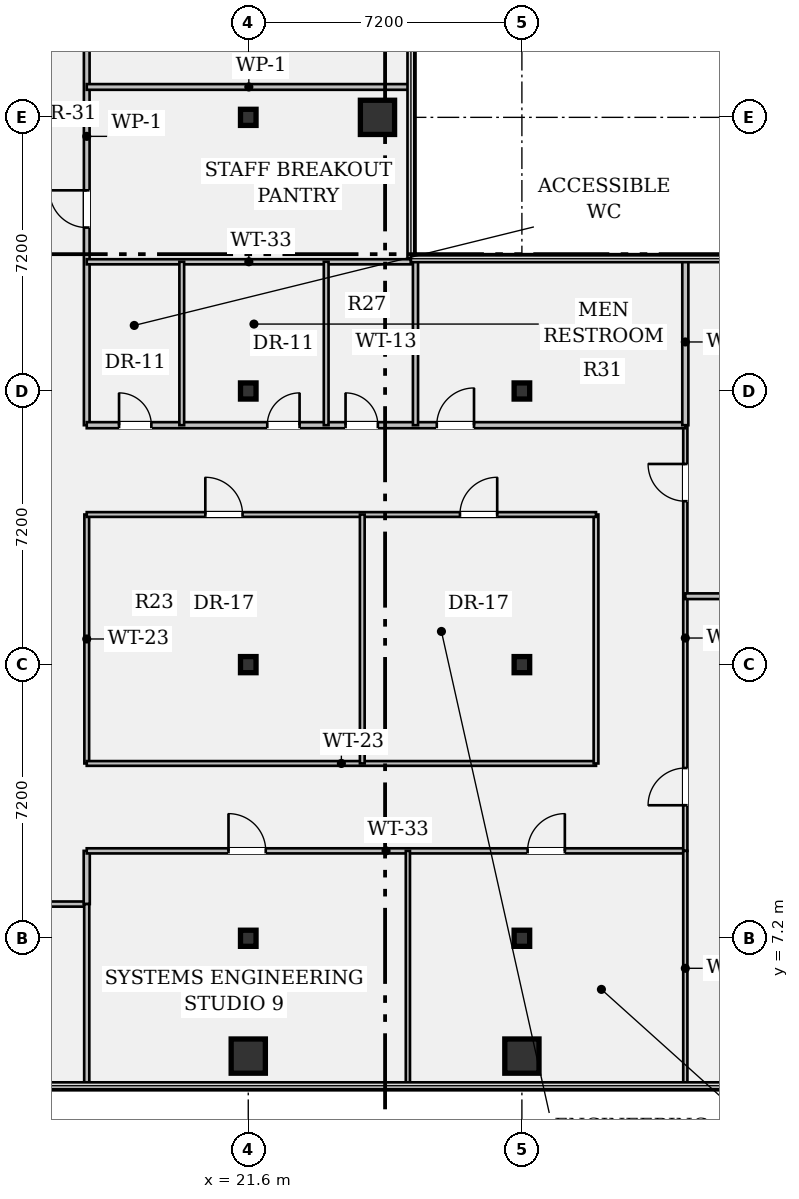
"""IFC4 building model, lengths in metres.
Left out: names, types, materials, properties, quantities, classifications, styles, units other than length and angle.
Written with IfcOpenShell. Run it as: python <this file> out.ifc"""

import sys

from ifc_helpers import new_model, si_unit, direction, frame, frame_2d, origin, origin_2d, place, context, subcontext, project, spatial, rectangle, hollow_rectangle, i_section, extrude, element, fill, save


model = new_model("IFC4")
c1 = context("Model", 3, precision=1e-05, world=origin(), true_north=direction((0.0, 1.0)))
c2 = subcontext(c1, "Body", "Model", "MODEL_VIEW")
j1 = project(units=[si_unit("LENGTHUNIT", "METRE"), si_unit("PLANEANGLEUNIT", "RADIAN")], contexts=[c1])
p1 = place(None, origin())
s1 = spatial("IfcSite", under=j1, at=p1, CompositionType="ELEMENT")
p2 = place(p1, origin())
s2 = spatial("IfcBuilding", under=s1, at=p2, CompositionType="ELEMENT")
p3 = place(p2, frame((0.0, 0.0, 144.55)))
s3 = spatial("IfcBuildingStorey", under=s2, at=p3, CompositionType="ELEMENT", Elevation=144.55)
p4 = place(p3, frame((21.6, 4.1, 0.0), z_axis=(0.0, 0.0, 1.0), x_axis=(1.0, 0.0, 0.0)))
e1 = element("IfcColumn", 1, at=p4, inside=s3, PredefinedType="COLUMN", context=c2, shape_type="SweptSolid", body=[
    extrude(hollow_rectangle(XDim=0.9, YDim=0.9, WallThickness=0.055, at=origin_2d()), origin(), (0.0, 0.0, 1.0), 3.58),
])
for number, where, z_axis, x_axis in (
    (2, (21.6, 7.2, 0.0), (0.0, 0.0, 1.0), (1.0, 0.0, 0.0)),
    (3, (21.6, 14.4, 0.0), (0.0, 0.0, 1.0), (1.0, 0.0, 0.0)),
    (4, (21.6, 21.6, 0.0), (0.0, 0.0, 1.0), (1.0, 0.0, 0.0)),
    (5, (21.6, 28.8, 0.0), (0.0, 0.0, 1.0), (1.0, 0.0, 0.0)),
):
    element("IfcColumn", number, at=place(p3, frame(where, z_axis=z_axis, x_axis=x_axis)), inside=s3, PredefinedType="COLUMN", context=c2, shape_type="SweptSolid", body=[
        extrude(i_section(OverallWidth=0.409, OverallDepth=0.424, WebThickness=0.033, FlangeThickness=0.052, FilletRadius=0.018, at=origin_2d()), origin(), (0.0, 0.0, 1.0), 3.58),
    ])
for number, where, z_axis, x_axis in (
    (6, (25.0, 28.8, 0.0), (0.0, 0.0, 1.0), (1.0, 0.0, 0.0)),
    (7, (28.8, 4.1, 0.0), (0.0, 0.0, 1.0), (1.0, 0.0, 0.0)),
):
    element("IfcColumn", number, at=place(p3, frame(where, z_axis=z_axis, x_axis=x_axis)), inside=s3, PredefinedType="COLUMN", context=c2, shape_type="SweptSolid", body=[
        extrude(hollow_rectangle(XDim=0.9, YDim=0.9, WallThickness=0.055, at=origin_2d()), origin(), (0.0, 0.0, 1.0), 3.58),
    ])
for number, where, z_axis, x_axis in (
    (8, (28.8, 7.2, 0.0), (0.0, 0.0, 1.0), (1.0, 0.0, 0.0)),
    (9, (28.8, 14.4, 0.0), (0.0, 0.0, 1.0), (1.0, 0.0, 0.0)),
    (10, (28.8, 21.6, 0.0), (0.0, 0.0, 1.0), (1.0, 0.0, 0.0)),
):
    element("IfcColumn", number, at=place(p3, frame(where, z_axis=z_axis, x_axis=x_axis)), inside=s3, PredefinedType="COLUMN", context=c2, shape_type="SweptSolid", body=[
        extrude(i_section(OverallWidth=0.409, OverallDepth=0.424, WebThickness=0.033, FlangeThickness=0.052, FilletRadius=0.018, at=origin_2d()), origin(), (0.0, 0.0, 1.0), 3.58),
    ])
p5 = place(p3, frame((14.4, 8.1, 0.0), z_axis=(0.0, 0.0, 1.0), x_axis=(1.0, 0.0, 0.0)))
e11 = element("IfcWall", 11, at=p5, inside=s3, PredefinedType="PARTITIONING", context=c2, shape_type="SweptSolid", body=[
    extrude(rectangle(XDim=2.95, YDim=0.135, at=frame_2d((1.475, 0.0))), origin(), (0.0, 0.0, 1.0), 3.148),
])
p6 = place(p5, frame((0.95, 0.0, 0.0)))
e12 = element("IfcOpeningElement", 12, at=p6, cuts=e11, PredefinedType="OPENING", context=c2, shape_type="SweptSolid", body=[
    extrude(rectangle(XDim=0.98, YDim=2.15, at=frame_2d((0.49, 1.075))), frame((0.0, 0.08, 0.0), z_axis=(0.0, -1.0, 0.0), x_axis=(1.0, 0.0, 0.0)), (0.0, 0.0, 1.0), 0.159),
])
p7 = place(p3, frame((17.35, 8.1, 0.0), z_axis=(0.0, 0.0, 1.0), x_axis=(0.0, 1.0, 0.0)))
e13 = element("IfcWall", 13, at=p7, inside=s3, PredefinedType="PARTITIONING", context=c2, shape_type="SweptSolid", body=[
    extrude(rectangle(XDim=1.4, YDim=0.16, at=frame_2d((0.7, 0.0))), origin(), (0.0, 0.0, 1.0), 3.58),
])
p8 = place(p3, frame((17.35, 20.7, 0.0), z_axis=(0.0, 0.0, 1.0), x_axis=(0.0, 1.0, 0.0)))
e14 = element("IfcWall", 14, at=p8, inside=s3, PredefinedType="PARTITIONING", context=c2, shape_type="SweptSolid", body=[
    extrude(rectangle(XDim=15.2, YDim=0.15, at=frame_2d((7.6, 0.0))), origin(), (0.0, 0.0, 1.0), 2.869),
])
p9 = place(p8, frame((5.2, 0.0, 0.0)))
e15 = element("IfcOpeningElement", 15, at=p9, cuts=e14, PredefinedType="OPENING", context=c2, shape_type="SweptSolid", body=[
    extrude(rectangle(XDim=0.98, YDim=2.15, at=frame_2d((0.49, 1.075))), frame((0.0, 0.087, 0.0), z_axis=(0.0, -1.0, 0.0), x_axis=(1.0, 0.0, 0.0)), (0.0, 0.0, 1.0), 0.174),
])
p10 = place(p8, frame((10.6, 0.0, 0.0)))
e16 = element("IfcOpeningElement", 16, at=p10, cuts=e14, PredefinedType="OPENING", context=c2, shape_type="SweptSolid", body=[
    extrude(rectangle(XDim=1.0, YDim=2.15, at=frame_2d((0.5, 1.075))), frame((0.0, 0.087, 0.0), z_axis=(0.0, -1.0, 0.0), x_axis=(1.0, 0.0, 0.0)), (0.0, 0.0, 1.0), 0.174),
])
p11 = place(p3, frame((17.35, 9.5, 0.0), z_axis=(0.0, 0.0, 1.0), x_axis=(1.0, 0.0, 0.0)))
e17 = element("IfcWall", 17, at=p11, inside=s3, PredefinedType="PARTITIONING", context=c2, shape_type="SweptSolid", body=[
    extrude(rectangle(XDim=15.75, YDim=0.135, at=frame_2d((7.875, 0.0))), origin(), (0.0, 0.0, 1.0), 2.869),
])
p12 = place(p11, frame((3.73, 0.0, 0.0)))
e18 = element("IfcOpeningElement", 18, at=p12, cuts=e17, PredefinedType="OPENING", context=c2, shape_type="SweptSolid", body=[
    extrude(rectangle(XDim=0.98, YDim=2.15, at=frame_2d((0.49, 1.075))), frame((0.0, 0.08, 0.0), z_axis=(0.0, -1.0, 0.0), x_axis=(1.0, 0.0, 0.0)), (0.0, 0.0, 1.0), 0.159),
])
p13 = place(p11, frame((11.6, 0.0, 0.0)))
e19 = element("IfcOpeningElement", 19, at=p13, cuts=e17, PredefinedType="OPENING", context=c2, shape_type="SweptSolid", body=[
    extrude(rectangle(XDim=0.98, YDim=2.15, at=frame_2d((0.49, 1.075))), frame((0.0, 0.08, 0.0), z_axis=(0.0, -1.0, 0.0), x_axis=(1.0, 0.0, 0.0)), (0.0, 0.0, 1.0), 0.159),
])
p14 = place(p3, frame((33.1, 9.5, 0.0), z_axis=(0.0, 0.0, 1.0), x_axis=(0.0, 1.0, 0.0)))
e20 = element("IfcWall", 20, at=p14, inside=s3, PredefinedType="PARTITIONING", context=c2, shape_type="SweptSolid", body=[
    extrude(rectangle(XDim=11.2, YDim=0.11, at=frame_2d((5.6, 0.0))), origin(), (0.0, 0.0, 1.0), 2.869),
])
p15 = place(p14, frame((1.2, 0.0, 0.0)))
e21 = element("IfcOpeningElement", 21, at=p15, cuts=e20, PredefinedType="OPENING", context=c2, shape_type="SweptSolid", body=[
    extrude(rectangle(XDim=0.98, YDim=2.15, at=frame_2d((0.49, 1.075))), frame((0.0, 0.067, 0.0), z_axis=(0.0, -1.0, 0.0), x_axis=(1.0, 0.0, 0.0)), (0.0, 0.0, 1.0), 0.134),
])
p16 = place(p14, frame((9.2, 0.0, 0.0)))
e22 = element("IfcOpeningElement", 22, at=p16, cuts=e20, PredefinedType="OPENING", context=c2, shape_type="SweptSolid", body=[
    extrude(rectangle(XDim=0.98, YDim=2.15, at=frame_2d((0.49, 1.075))), frame((0.0, 0.067, 0.0), z_axis=(0.0, -1.0, 0.0), x_axis=(1.0, 0.0, 0.0)), (0.0, 0.0, 1.0), 0.134),
])
p17 = place(p3, frame((17.35, 20.7, 0.0), z_axis=(0.0, 0.0, 1.0), x_axis=(1.0, 0.0, 0.0)))
e23 = element("IfcWall", 23, at=p17, inside=s3, PredefinedType="PARTITIONING", context=c2, shape_type="SweptSolid", body=[
    extrude(rectangle(XDim=15.75, YDim=0.16, at=frame_2d((7.875, 0.0))), origin(), (0.0, 0.0, 1.0), 2.869),
])
p18 = place(p17, frame((0.85, 0.0, 0.0)))
e24 = element("IfcOpeningElement", 24, at=p18, cuts=e23, PredefinedType="OPENING", context=c2, shape_type="SweptSolid", body=[
    extrude(rectangle(XDim=0.85, YDim=2.15, at=frame_2d((0.425, 1.075))), frame((0.0, 0.092, 0.0), z_axis=(0.0, -1.0, 0.0), x_axis=(1.0, 0.0, 0.0)), (0.0, 0.0, 1.0), 0.184),
])
p19 = place(p17, frame((4.75, 0.0, 0.0)))
e25 = element("IfcOpeningElement", 25, at=p19, cuts=e23, PredefinedType="OPENING", context=c2, shape_type="SweptSolid", body=[
    extrude(rectangle(XDim=0.85, YDim=2.15, at=frame_2d((0.425, 1.075))), frame((0.0, 0.092, 0.0), z_axis=(0.0, -1.0, 0.0), x_axis=(1.0, 0.0, 0.0)), (0.0, 0.0, 1.0), 0.184),
])
p20 = place(p17, frame((6.81, 0.0, 0.0)))
e26 = element("IfcOpeningElement", 26, at=p20, cuts=e23, PredefinedType="OPENING", context=c2, shape_type="SweptSolid", body=[
    extrude(rectangle(XDim=0.85, YDim=2.15, at=frame_2d((0.425, 1.075))), frame((0.0, 0.092, 0.0), z_axis=(0.0, -1.0, 0.0), x_axis=(1.0, 0.0, 0.0)), (0.0, 0.0, 1.0), 0.184),
])
p21 = place(p17, frame((9.21, 0.0, 0.0)))
e27 = element("IfcOpeningElement", 27, at=p21, cuts=e23, PredefinedType="OPENING", context=c2, shape_type="SweptSolid", body=[
    extrude(rectangle(XDim=0.98, YDim=2.15, at=frame_2d((0.49, 1.075))), frame((0.0, 0.092, 0.0), z_axis=(0.0, -1.0, 0.0), x_axis=(1.0, 0.0, 0.0)), (0.0, 0.0, 1.0), 0.184),
])
p22 = place(p3, frame((17.35, 11.8, 0.0), z_axis=(0.0, 0.0, 1.0), x_axis=(0.0, 1.0, 0.0)))
e28 = element("IfcWall", 28, at=p22, inside=s3, PredefinedType="PARTITIONING", context=c2, shape_type="SweptSolid", body=[
    extrude(rectangle(XDim=6.55, YDim=0.125, at=frame_2d((3.275, 0.0))), origin(), (0.0, 0.0, 1.0), 2.869),
])
p23 = place(p3, frame((17.35, 11.8, 0.0), z_axis=(0.0, 0.0, 1.0), x_axis=(1.0, 0.0, 0.0)))
e29 = element("IfcWall", 29, at=p23, inside=s3, PredefinedType="PARTITIONING", context=c2, shape_type="SweptSolid", body=[
    extrude(rectangle(XDim=13.4, YDim=0.125, at=frame_2d((6.7, 0.0))), origin(), (0.0, 0.0, 1.0), 2.869),
])
p24 = place(p3, frame((30.75, 11.8, 0.0), z_axis=(0.0, 0.0, 1.0), x_axis=(0.0, 1.0, 0.0)))
e30 = element("IfcWall", 30, at=p24, inside=s3, PredefinedType="PARTITIONING", context=c2, shape_type="SweptSolid", body=[
    extrude(rectangle(XDim=6.55, YDim=0.125, at=frame_2d((3.275, 0.0))), origin(), (0.0, 0.0, 1.0), 2.869),
])
p25 = place(p3, frame((17.35, 18.35, 0.0), z_axis=(0.0, 0.0, 1.0), x_axis=(1.0, 0.0, 0.0)))
e31 = element("IfcWall", 31, at=p25, inside=s3, PredefinedType="PARTITIONING", context=c2, shape_type="SweptSolid", body=[
    extrude(rectangle(XDim=13.4, YDim=0.125, at=frame_2d((6.7, 0.0))), origin(), (0.0, 0.0, 1.0), 2.869),
])
p26 = place(p25, frame((3.12, 0.0, 0.0)))
e32 = element("IfcOpeningElement", 32, at=p26, cuts=e31, PredefinedType="OPENING", context=c2, shape_type="SweptSolid", body=[
    extrude(rectangle(XDim=0.98, YDim=2.15, at=frame_2d((0.49, 1.075))), frame((0.0, 0.074, 0.0), z_axis=(0.0, -1.0, 0.0), x_axis=(1.0, 0.0, 0.0)), (0.0, 0.0, 1.0), 0.149),
])
p27 = place(p25, frame((9.82, 0.0, 0.0)))
e33 = element("IfcOpeningElement", 33, at=p27, cuts=e31, PredefinedType="OPENING", context=c2, shape_type="SweptSolid", body=[
    extrude(rectangle(XDim=0.98, YDim=2.15, at=frame_2d((0.49, 1.075))), frame((0.0, 0.074, 0.0), z_axis=(0.0, -1.0, 0.0), x_axis=(1.0, 0.0, 0.0)), (0.0, 0.0, 1.0), 0.149),
])
p28 = place(p3, frame((24.6, 11.8, 0.0), z_axis=(0.0, 0.0, 1.0), x_axis=(0.0, 1.0, 0.0)))
e34 = element("IfcWall", 34, at=p28, inside=s3, PredefinedType="PARTITIONING", context=c2, shape_type="SweptSolid", body=[
    extrude(rectangle(XDim=6.55, YDim=0.125, at=frame_2d((3.275, 0.0))), origin(), (0.0, 0.0, 1.0), 2.869),
])
p29 = place(p3, frame((17.35, 25.0, 0.0), z_axis=(0.0, 0.0, 1.0), x_axis=(1.0, 0.0, 0.0)))
e35 = element("IfcWall", 35, at=p29, inside=s3, PredefinedType="PARTITIONING", context=c2, shape_type="SweptSolid", body=[
    extrude(rectangle(XDim=8.53, YDim=0.135, at=frame_2d((4.265, 0.0))), origin(), (0.0, 0.0, 1.0), 2.869),
])
for number, where, z_axis, x_axis in (
    (36, (19.85, 20.7, 0.0), (0.0, 0.0, 1.0), (0.0, 1.0, 0.0)),
    (37, (23.65, 20.7, 0.0), (0.0, 0.0, 1.0), (0.0, 1.0, 0.0)),
):
    element("IfcWall", number, at=place(p3, frame(where, z_axis=z_axis, x_axis=x_axis)), inside=s3, PredefinedType="PARTITIONING", context=c2, shape_type="SweptSolid", body=[
        extrude(rectangle(XDim=4.3, YDim=0.125, at=frame_2d((2.15, 0.0))), origin(), (0.0, 0.0, 1.0), 2.869),
    ])
p30 = place(p3, frame((17.35, 29.6, 0.0), z_axis=(0.0, 0.0, 1.0), x_axis=(1.0, 0.0, 0.0)))
e38 = element("IfcWall", 38, at=p30, inside=s3, PredefinedType="PARTITIONING", context=c2, shape_type="SweptSolid", body=[
    extrude(rectangle(XDim=8.53, YDim=0.15, at=frame_2d((4.265, 0.0))), origin(), (0.0, 0.0, 1.0), 2.869),
])
p31 = place(p3, frame((26.0, 20.7, 0.0), z_axis=(0.0, 0.0, 1.0), x_axis=(0.0, 1.0, 0.0)))
e39 = element("IfcWall", 39, at=p31, inside=s3, PredefinedType="PARTITIONING", context=c2, shape_type="SweptSolid", body=[
    extrude(rectangle(XDim=4.38, YDim=0.135, at=frame_2d((2.19, 0.0))), origin(), (0.0, 0.0, 1.0), 2.869),
])
p32 = place(p3, frame((33.1, 3.32, 0.0), z_axis=(0.0, 0.0, 1.0), x_axis=(0.0, 1.0, 0.0)))
e40 = element("IfcWall", 40, at=p32, inside=s3, PredefinedType="PARTITIONING", context=c2, shape_type="SweptSolid", body=[
    extrude(rectangle(XDim=6.18, YDim=0.11, at=frame_2d((3.09, 0.0))), origin(), (0.0, 0.0, 1.0), 2.869),
])
p33 = place(p3, frame((33.1, 20.7, 0.0), z_axis=(0.0, 0.0, 1.0), x_axis=(0.0, 1.0, 0.0)))
e41 = element("IfcWall", 41, at=p33, inside=s3, PredefinedType="PARTITIONING", context=c2, shape_type="SweptSolid", body=[
    extrude(rectangle(XDim=4.38, YDim=0.16, at=frame_2d((2.19, 0.0))), origin(), (0.0, 0.0, 1.0), 2.869),
])
p34 = place(p3, frame((33.1, 16.2, 0.0), z_axis=(0.0, 0.0, 1.0), x_axis=(1.0, 0.0, 0.0)))
e42 = element("IfcWall", 42, at=p34, inside=s3, PredefinedType="PARTITIONING", context=c2, shape_type="SweptSolid", body=[
    extrude(rectangle(XDim=13.98, YDim=0.15, at=frame_2d((6.99, 0.0))), origin(), (0.0, 0.0, 1.0), 2.869),
])
p35 = place(p3, frame((17.35, 3.32, 0.0), z_axis=(0.0, 0.0, 1.0), x_axis=(0.0, 1.0, 0.0)))
e43 = element("IfcWall", 43, at=p35, inside=s3, PredefinedType="PARTITIONING", context=c2, shape_type="SweptSolid", body=[
    extrude(rectangle(XDim=4.78, YDim=0.135, at=frame_2d((2.39, 0.0))), origin(), (0.0, 0.0, 1.0), 2.869),
])
p36 = place(p3, frame((25.8, 3.32, 0.0), z_axis=(0.0, 0.0, 1.0), x_axis=(0.0, 1.0, 0.0)))
e44 = element("IfcWall", 44, at=p36, inside=s3, PredefinedType="PARTITIONING", context=c2, shape_type="SweptSolid", body=[
    extrude(rectangle(XDim=6.18, YDim=0.11, at=frame_2d((3.09, 0.0))), origin(), (0.0, 0.0, 1.0), 2.869),
])
p37 = place(p26, origin())
e45 = element("IfcDoor", 45, at=p37, inside=s3, OperationType="SINGLE_SWING_LEFT", PredefinedType="DOOR", context=c2, shape_type="SweptSolid", body=[
    extrude(rectangle(XDim=0.98, YDim=2.15, at=frame_2d((0.49, 1.075))), frame((0.0, 0.025, 0.0), z_axis=(0.0, -1.0, 0.0), x_axis=(1.0, 0.0, 0.0)), (0.0, 0.0, 1.0), 0.05),
])
fill(e32, e45)
p38 = place(p27, origin())
e46 = element("IfcDoor", 46, at=p38, inside=s3, OperationType="SINGLE_SWING_RIGHT", PredefinedType="DOOR", context=c2, shape_type="SweptSolid", body=[
    extrude(rectangle(XDim=0.98, YDim=2.15, at=frame_2d((0.49, 1.075))), frame((0.0, 0.025, 0.0), z_axis=(0.0, -1.0, 0.0), x_axis=(1.0, 0.0, 0.0)), (0.0, 0.0, 1.0), 0.05),
])
fill(e33, e46)
p39 = place(p18, origin())
e47 = element("IfcDoor", 47, at=p39, inside=s3, OperationType="SINGLE_SWING_LEFT", PredefinedType="DOOR", context=c2, shape_type="SweptSolid", body=[
    extrude(rectangle(XDim=0.85, YDim=2.15, at=frame_2d((0.425, 1.075))), frame((0.0, 0.025, 0.0), z_axis=(0.0, -1.0, 0.0), x_axis=(1.0, 0.0, 0.0)), (0.0, 0.0, 1.0), 0.05),
])
fill(e24, e47)
p40 = place(p19, origin())
e48 = element("IfcDoor", 48, at=p40, inside=s3, OperationType="SINGLE_SWING_RIGHT", PredefinedType="DOOR", context=c2, shape_type="SweptSolid", body=[
    extrude(rectangle(XDim=0.85, YDim=2.15, at=frame_2d((0.425, 1.075))), frame((0.0, 0.025, 0.0), z_axis=(0.0, -1.0, 0.0), x_axis=(1.0, 0.0, 0.0)), (0.0, 0.0, 1.0), 0.05),
])
fill(e25, e48)
p41 = place(p20, origin())
e49 = element("IfcDoor", 49, at=p41, inside=s3, OperationType="SINGLE_SWING_LEFT", PredefinedType="DOOR", context=c2, shape_type="SweptSolid", body=[
    extrude(rectangle(XDim=0.85, YDim=2.15, at=frame_2d((0.425, 1.075))), frame((0.0, 0.025, 0.0), z_axis=(0.0, -1.0, 0.0), x_axis=(1.0, 0.0, 0.0)), (0.0, 0.0, 1.0), 0.05),
])
fill(e26, e49)
p42 = place(p9, origin())
e50 = element("IfcDoor", 50, at=p42, inside=s3, OperationType="SINGLE_SWING_RIGHT", PredefinedType="DOOR", context=c2, shape_type="SweptSolid", body=[
    extrude(rectangle(XDim=0.98, YDim=2.15, at=frame_2d((0.49, 1.075))), frame((0.0, 0.025, 0.0), z_axis=(0.0, -1.0, 0.0), x_axis=(1.0, 0.0, 0.0)), (0.0, 0.0, 1.0), 0.05),
])
fill(e15, e50)
p43 = place(p21, origin())
e51 = element("IfcDoor", 51, at=p43, inside=s3, OperationType="SINGLE_SWING_RIGHT", PredefinedType="DOOR", context=c2, shape_type="SweptSolid", body=[
    extrude(rectangle(XDim=0.98, YDim=2.15, at=frame_2d((0.49, 1.075))), frame((0.0, 0.025, 0.0), z_axis=(0.0, -1.0, 0.0), x_axis=(1.0, 0.0, 0.0)), (0.0, 0.0, 1.0), 0.05),
])
fill(e27, e51)
p44 = place(p15, origin())
e52 = element("IfcDoor", 52, at=p44, inside=s3, OperationType="SINGLE_SWING_LEFT", PredefinedType="DOOR", context=c2, shape_type="SweptSolid", body=[
    extrude(rectangle(XDim=0.98, YDim=2.15, at=frame_2d((0.49, 1.075))), frame((0.0, 0.025, 0.0), z_axis=(0.0, -1.0, 0.0), x_axis=(1.0, 0.0, 0.0)), (0.0, 0.0, 1.0), 0.05),
])
fill(e21, e52)
p45 = place(p16, origin())
e53 = element("IfcDoor", 53, at=p45, inside=s3, OperationType="SINGLE_SWING_RIGHT", PredefinedType="DOOR", context=c2, shape_type="SweptSolid", body=[
    extrude(rectangle(XDim=0.98, YDim=2.15, at=frame_2d((0.49, 1.075))), frame((0.0, 0.025, 0.0), z_axis=(0.0, -1.0, 0.0), x_axis=(1.0, 0.0, 0.0)), (0.0, 0.0, 1.0), 0.05),
])
fill(e22, e53)
p46 = place(p12, origin())
e54 = element("IfcDoor", 54, at=p46, inside=s3, OperationType="SINGLE_SWING_LEFT", PredefinedType="DOOR", context=c2, shape_type="SweptSolid", body=[
    extrude(rectangle(XDim=0.98, YDim=2.15, at=frame_2d((0.49, 1.075))), frame((0.0, 0.025, 0.0), z_axis=(0.0, -1.0, 0.0), x_axis=(1.0, 0.0, 0.0)), (0.0, 0.0, 1.0), 0.05),
])
fill(e18, e54)
p47 = place(p13, origin())
e55 = element("IfcDoor", 55, at=p47, inside=s3, OperationType="SINGLE_SWING_RIGHT", PredefinedType="DOOR", context=c2, shape_type="SweptSolid", body=[
    extrude(rectangle(XDim=0.98, YDim=2.15, at=frame_2d((0.49, 1.075))), frame((0.0, 0.025, 0.0), z_axis=(0.0, -1.0, 0.0), x_axis=(1.0, 0.0, 0.0)), (0.0, 0.0, 1.0), 0.05),
])
fill(e19, e55)
save(model, sys.argv[1])
